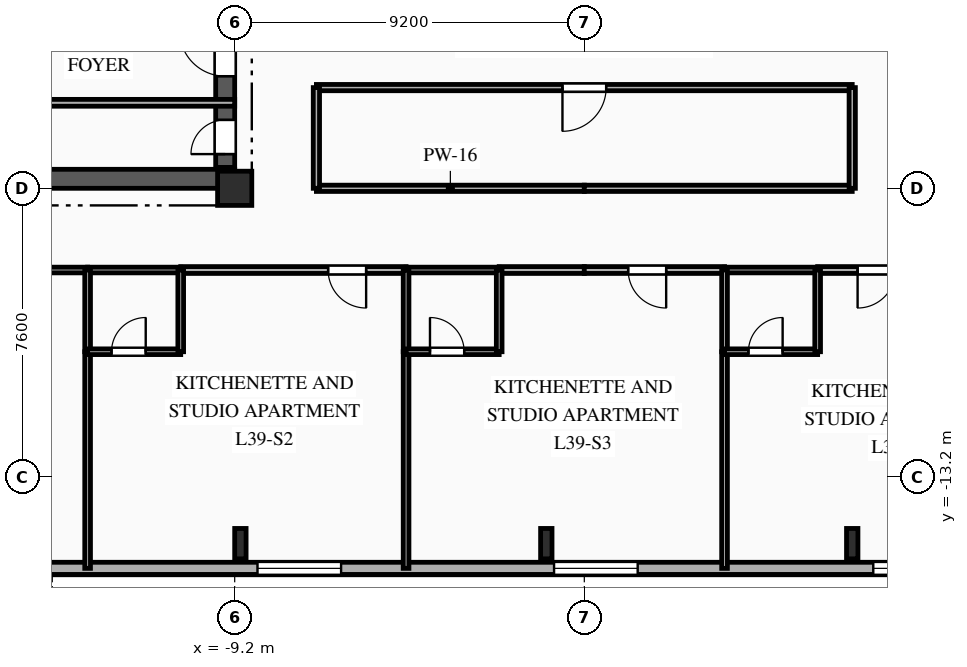
"""IFC4 building model, lengths in metres.
Left out: names, types, materials, properties, quantities, classifications, styles, units other than length and angle.
Written with IfcOpenShell. Run it as: python <this file> out.ifc"""

import sys

from ifc_helpers import new_model, si_unit, direction, frame, frame_2d, origin, origin_2d, place, context, subcontext, project, spatial, rectangle, i_section, extrude, element, fill, save


model = new_model("IFC4")
c1 = context("Model", 3, precision=1e-05, world=origin(), true_north=direction((0.0, 1.0)))
c2 = subcontext(c1, "Body", "Model", "MODEL_VIEW")
j1 = project(units=[si_unit("LENGTHUNIT", "METRE"), si_unit("PLANEANGLEUNIT", "RADIAN")], contexts=[c1])
p1 = place(None, origin())
s1 = spatial("IfcSite", under=j1, at=p1, CompositionType="ELEMENT")
p2 = place(p1, origin())
s2 = spatial("IfcBuilding", under=s1, at=p2, CompositionType="ELEMENT")
p3 = place(p2, frame((0.0, 0.0, 141.05)))
s3 = spatial("IfcBuildingStorey", under=s2, at=p3, CompositionType="ELEMENT", Elevation=141.05)
p4 = place(p3, frame((-9.2, -5.6, 0.0), z_axis=(0.0, 0.0, 1.0), x_axis=(1.0, 0.0, 0.0)))
e1 = element("IfcColumn", 1, at=p4, inside=s3, PredefinedType="COLUMN", context=c2, shape_type="SweptSolid", body=[
    extrude(rectangle(XDim=0.9, YDim=0.9, at=origin_2d()), origin(), (0.0, 0.0, 1.0), 3.35),
])
for number, where, z_axis, x_axis in (
    (2, (-9.05, -14.95, 0.0), (0.0, 0.0, 1.0), (1.0, 0.0, 0.0)),
    (3, (-1.0, -14.95, 0.0), (0.0, 0.0, 1.0), (1.0, 0.0, 0.0)),
    (4, (7.05, -14.95, 0.0), (0.0, 0.0, 1.0), (1.0, 0.0, 0.0)),
):
    element("IfcColumn", number, at=place(p3, frame(where, z_axis=z_axis, x_axis=x_axis)), inside=s3, PredefinedType="COLUMN", context=c2, shape_type="SweptSolid", body=[
        extrude(i_section(OverallWidth=0.3, OverallDepth=0.8, WebThickness=0.018, FlangeThickness=0.033, FilletRadius=0.03, at=origin_2d()), origin(), (0.0, 0.0, 1.0), 3.35),
    ])
p5 = place(p3, frame((23.8, -15.6, 0.0), z_axis=(0.0, 0.0, 1.0), x_axis=(-1.0, 0.0, 0.0)))
e5 = element("IfcWall", 5, at=p5, inside=s3, PredefinedType="SOLIDWALL", context=c2, shape_type="SweptSolid", body=[
    extrude(rectangle(XDim=49.6, YDim=0.32, at=frame_2d((24.8, 0.0))), origin(), (0.0, 0.0, 1.0), 3.04),
])
p6 = place(p5, frame((1.13, 0.0, 0.85)))
e6 = element("IfcOpeningElement", 6, at=p6, cuts=e5, PredefinedType="OPENING", context=c2, shape_type="SweptSolid", body=[
    extrude(rectangle(XDim=1.1, YDim=1.85, at=frame_2d((0.55, 0.925))), frame((0.0, 0.17, 0.0), z_axis=(0.0, -1.0, 0.0), x_axis=(1.0, 0.0, 0.0)), (0.0, 0.0, 1.0), 0.34),
])
p7 = place(p5, frame((6.495, 0.0, 0.85)))
e7 = element("IfcOpeningElement", 7, at=p7, cuts=e5, PredefinedType="OPENING", context=c2, shape_type="SweptSolid", body=[
    extrude(rectangle(XDim=1.65, YDim=1.85, at=frame_2d((0.825, 0.925))), frame((0.0, 0.17, 0.0), z_axis=(0.0, -1.0, 0.0), x_axis=(1.0, 0.0, 0.0)), (0.0, 0.0, 1.0), 0.34),
])
p8 = place(p5, frame((13.996, 0.0, 0.85)))
e8 = element("IfcOpeningElement", 8, at=p8, cuts=e5, PredefinedType="OPENING", context=c2, shape_type="SweptSolid", body=[
    extrude(rectangle(XDim=2.2, YDim=1.85, at=frame_2d((1.1, 0.925))), frame((0.0, 0.17, 0.0), z_axis=(0.0, -1.0, 0.0), x_axis=(1.0, 0.0, 0.0)), (0.0, 0.0, 1.0), 0.34),
])
p9 = place(p5, frame((22.396, 0.0, 0.85)))
e9 = element("IfcOpeningElement", 9, at=p9, cuts=e5, PredefinedType="OPENING", context=c2, shape_type="SweptSolid", body=[
    extrude(rectangle(XDim=2.2, YDim=1.85, at=frame_2d((1.1, 0.925))), frame((0.0, 0.17, 0.0), z_axis=(0.0, -1.0, 0.0), x_axis=(1.0, 0.0, 0.0)), (0.0, 0.0, 1.0), 0.34),
])
p10 = place(p5, frame((30.2, 0.0, 0.85)))
e10 = element("IfcOpeningElement", 10, at=p10, cuts=e5, PredefinedType="OPENING", context=c2, shape_type="SweptSolid", body=[
    extrude(rectangle(XDim=2.2, YDim=1.85, at=frame_2d((1.1, 0.925))), frame((0.0, 0.17, 0.0), z_axis=(0.0, -1.0, 0.0), x_axis=(1.0, 0.0, 0.0)), (0.0, 0.0, 1.0), 0.34),
])
p11 = place(p5, frame((38.673, 0.0, 0.85)))
e11 = element("IfcOpeningElement", 11, at=p11, cuts=e5, PredefinedType="OPENING", context=c2, shape_type="SweptSolid", body=[
    extrude(rectangle(XDim=1.65, YDim=1.85, at=frame_2d((0.825, 0.925))), frame((0.0, 0.17, 0.0), z_axis=(0.0, -1.0, 0.0), x_axis=(1.0, 0.0, 0.0)), (0.0, 0.0, 1.0), 0.34),
])
p12 = place(p5, frame((46.175, 0.0, 0.85)))
e12 = element("IfcOpeningElement", 12, at=p12, cuts=e5, PredefinedType="OPENING", context=c2, shape_type="SweptSolid", body=[
    extrude(rectangle(XDim=1.65, YDim=1.85, at=frame_2d((0.825, 0.925))), frame((0.0, 0.17, 0.0), z_axis=(0.0, -1.0, 0.0), x_axis=(1.0, 0.0, 0.0)), (0.0, 0.0, 1.0), 0.34),
])
p13 = place(p3, frame((-18.8, -5.35, 0.0), z_axis=(0.0, 0.0, 1.0), x_axis=(1.0, 0.0, 0.0)))
e13 = element("IfcWall", 13, at=p13, inside=s3, PredefinedType="SHEAR", context=c2, shape_type="SweptSolid", body=[
    extrude(rectangle(XDim=9.6, YDim=0.5, at=frame_2d((4.8, 0.0))), origin(), (0.0, 0.0, 1.0), 3.04),
])
p14 = place(p13, frame((1.05, 0.0, 0.0)))
e14 = element("IfcOpeningElement", 14, at=p14, cuts=e13, PredefinedType="OPENING", context=c2, shape_type="SweptSolid", body=[
    extrude(rectangle(XDim=0.9, YDim=2.1, at=frame_2d((0.45, 1.05))), frame((0.0, 0.26, 0.0), z_axis=(0.0, -1.0, 0.0), x_axis=(1.0, 0.0, 0.0)), (0.0, 0.0, 1.0), 0.52),
])
p15 = place(p3, frame((-9.45, -5.05, 0.0), z_axis=(0.0, 0.0, 1.0), x_axis=(0.0, 1.0, 0.0)))
e15 = element("IfcWall", 15, at=p15, inside=s3, PredefinedType="SHEAR", context=c2, shape_type="SweptSolid", body=[
    extrude(rectangle(XDim=10.1, YDim=0.5, at=frame_2d((5.05, 0.0))), origin(), (0.0, 0.0, 1.0), 3.04),
])
p16 = place(p15, frame((7.15, 0.0, 0.0)))
e16 = element("IfcOpeningElement", 16, at=p16, cuts=e15, PredefinedType="OPENING", context=c2, shape_type="SweptSolid", body=[
    extrude(rectangle(XDim=0.9, YDim=2.1, at=frame_2d((0.45, 1.05))), frame((0.0, 0.26, 0.0), z_axis=(0.0, -1.0, 0.0), x_axis=(1.0, 0.0, 0.0)), (0.0, 0.0, 1.0), 0.52),
])
p17 = place(p15, frame((2.4, 0.0, 0.0)))
e17 = element("IfcOpeningElement", 17, at=p17, cuts=e15, PredefinedType="OPENING", context=c2, shape_type="SweptSolid", body=[
    extrude(rectangle(XDim=1.2, YDim=2.15, at=frame_2d((0.6, 1.075))), frame((0.0, 0.26, 0.0), z_axis=(0.0, -1.0, 0.0), x_axis=(1.0, 0.0, 0.0)), (0.0, 0.0, 1.0), 0.52),
])
p18 = place(p15, frame((0.35, 0.0, 0.0)))
e18 = element("IfcOpeningElement", 18, at=p18, cuts=e15, PredefinedType="OPENING", context=c2, shape_type="SweptSolid", body=[
    extrude(rectangle(XDim=0.9, YDim=2.1, at=frame_2d((0.45, 1.05))), frame((0.0, 0.26, 0.0), z_axis=(0.0, -1.0, 0.0), x_axis=(1.0, 0.0, 0.0)), (0.0, 0.0, 1.0), 0.52),
])
p19 = place(p15, frame((5.0, 0.0, 0.0)))
e19 = element("IfcOpeningElement", 19, at=p19, cuts=e15, PredefinedType="OPENING", context=c2, shape_type="SweptSolid", body=[
    extrude(rectangle(XDim=0.9, YDim=2.1, at=frame_2d((0.45, 1.05))), frame((0.0, 0.26, 0.0), z_axis=(0.0, -1.0, 0.0), x_axis=(1.0, 0.0, 0.0)), (0.0, 0.0, 1.0), 0.52),
])
p20 = place(p3, frame((-15.05, -3.35, 0.0), z_axis=(0.0, 0.0, 1.0), x_axis=(1.0, 0.0, 0.0)))
e20 = element("IfcWall", 20, at=p20, inside=s3, PredefinedType="PARTITIONING", context=c2, shape_type="SweptSolid", body=[
    extrude(rectangle(XDim=5.85, YDim=0.18, at=frame_2d((2.925, 0.0))), origin(), (0.0, 0.0, 1.0), 2.755),
])
p21 = place(p3, frame((-13.07, -7.75, 0.0), z_axis=(0.0, 0.0, 1.0), x_axis=(-1.0, 0.0, 0.0)))
e21 = element("IfcWall", 21, at=p21, inside=s3, PredefinedType="PARTITIONING", context=c2, shape_type="SweptSolid", body=[
    extrude(rectangle(XDim=7.88, YDim=0.15, at=frame_2d((3.94, 0.0))), origin(), (0.0, 0.0, 1.0), 3.04),
])
p22 = place(p21, frame((1.289, 0.0, 0.0)))
e22 = element("IfcOpeningElement", 22, at=p22, cuts=e21, PredefinedType="OPENING", context=c2, shape_type="SweptSolid", body=[
    extrude(rectangle(XDim=1.05, YDim=2.15, at=frame_2d((0.525, 1.075))), frame((0.0, 0.085, 0.0), z_axis=(0.0, -1.0, 0.0), x_axis=(1.0, 0.0, 0.0)), (0.0, 0.0, 1.0), 0.17),
])
p23 = place(p3, frame((-4.69, -7.75, 0.0), z_axis=(0.0, 0.0, 1.0), x_axis=(-1.0, 0.0, 0.0)))
e23 = element("IfcWall", 23, at=p23, inside=s3, PredefinedType="PARTITIONING", context=c2, shape_type="SweptSolid", body=[
    extrude(rectangle(XDim=5.93, YDim=0.18, at=frame_2d((2.965, 0.0))), origin(), (0.0, 0.0, 1.0), 3.04),
])
p24 = place(p23, frame((1.051, 0.0, 0.0)))
e24 = element("IfcOpeningElement", 24, at=p24, cuts=e23, PredefinedType="OPENING", context=c2, shape_type="SweptSolid", body=[
    extrude(rectangle(XDim=1.0, YDim=2.15, at=frame_2d((0.5, 1.075))), frame((0.0, 0.1, 0.0), z_axis=(0.0, -1.0, 0.0), x_axis=(1.0, 0.0, 0.0)), (0.0, 0.0, 1.0), 0.2),
])
p25 = place(p3, frame((-10.62, -7.75, 0.0), z_axis=(0.0, 0.0, 1.0), x_axis=(-1.0, 0.0, 0.0)))
e25 = element("IfcWall", 25, at=p25, inside=s3, PredefinedType="PLUMBINGWALL", context=c2, shape_type="SweptSolid", body=[
    extrude(rectangle(XDim=2.45, YDim=0.15, at=frame_2d((1.225, 0.0))), origin(), (0.0, 0.0, 1.0), 3.04),
])
p26 = place(p3, frame((0.0, -7.75, 0.0), z_axis=(0.0, 0.0, 1.0), x_axis=(-1.0, 0.0, 0.0)))
e26 = element("IfcWall", 26, at=p26, inside=s3, PredefinedType="PARTITIONING", context=c2, shape_type="SweptSolid", body=[
    extrude(rectangle(XDim=2.24, YDim=0.18, at=frame_2d((1.12, 0.0))), origin(), (0.0, 0.0, 1.0), 3.04),
])
p27 = place(p3, frame((-2.24, -7.75, 0.0), z_axis=(0.0, 0.0, 1.0), x_axis=(-1.0, 0.0, 0.0)))
e27 = element("IfcWall", 27, at=p27, inside=s3, PredefinedType="PLUMBINGWALL", context=c2, shape_type="SweptSolid", body=[
    extrude(rectangle(XDim=2.45, YDim=0.15, at=frame_2d((1.225, 0.0))), origin(), (0.0, 0.0, 1.0), 3.04),
])
p28 = place(p3, frame((-7.05, -5.6, 0.0), z_axis=(0.0, 0.0, 1.0), x_axis=(1.0, 0.0, 0.0)))
e28 = element("IfcWall", 28, at=p28, inside=s3, PredefinedType="PARTITIONING", context=c2, shape_type="SweptSolid", body=[
    extrude(rectangle(XDim=7.05, YDim=0.165, at=frame_2d((3.525, 0.0))), origin(), (0.0, 0.0, 1.0), 2.525),
])
p29 = place(p3, frame((3.69, -7.75, 0.0), z_axis=(0.0, 0.0, 1.0), x_axis=(-1.0, 0.0, 0.0)))
e29 = element("IfcWall", 29, at=p29, inside=s3, PredefinedType="PARTITIONING", context=c2, shape_type="SweptSolid", body=[
    extrude(rectangle(XDim=3.69, YDim=0.18, at=frame_2d((1.845, 0.0))), origin(), (0.0, 0.0, 1.0), 3.04),
])
p30 = place(p29, frame((1.536, 0.0, 0.0)))
e30 = element("IfcOpeningElement", 30, at=p30, cuts=e29, PredefinedType="OPENING", context=c2, shape_type="SweptSolid", body=[
    extrude(rectangle(XDim=1.0, YDim=2.15, at=frame_2d((0.5, 1.075))), frame((0.0, 0.1, 0.0), z_axis=(0.0, -1.0, 0.0), x_axis=(1.0, 0.0, 0.0)), (0.0, 0.0, 1.0), 0.2),
])
p31 = place(p3, frame((12.07, -7.75, 0.0), z_axis=(0.0, 0.0, 1.0), x_axis=(-1.0, 0.0, 0.0)))
e31 = element("IfcWall", 31, at=p31, inside=s3, PredefinedType="PARTITIONING", context=c2, shape_type="SweptSolid", body=[
    extrude(rectangle(XDim=5.93, YDim=0.18, at=frame_2d((2.965, 0.0))), origin(), (0.0, 0.0, 1.0), 3.04),
])
p32 = place(p31, frame((3.879, 0.0, 0.0)))
e32 = element("IfcOpeningElement", 32, at=p32, cuts=e31, PredefinedType="OPENING", context=c2, shape_type="SweptSolid", body=[
    extrude(rectangle(XDim=1.0, YDim=2.15, at=frame_2d((0.5, 1.075))), frame((0.0, 0.1, 0.0), z_axis=(0.0, -1.0, 0.0), x_axis=(1.0, 0.0, 0.0)), (0.0, 0.0, 1.0), 0.2),
])
p33 = place(p3, frame((6.14, -7.75, 0.0), z_axis=(0.0, 0.0, 1.0), x_axis=(-1.0, 0.0, 0.0)))
e33 = element("IfcWall", 33, at=p33, inside=s3, PredefinedType="PLUMBINGWALL", context=c2, shape_type="SweptSolid", body=[
    extrude(rectangle(XDim=2.45, YDim=0.15, at=frame_2d((1.225, 0.0))), origin(), (0.0, 0.0, 1.0), 3.04),
])
p34 = place(p3, frame((0.0, -5.6, 0.0), z_axis=(0.0, 0.0, 1.0), x_axis=(1.0, 0.0, 0.0)))
e34 = element("IfcWall", 34, at=p34, inside=s3, PredefinedType="PARTITIONING", context=c2, shape_type="SweptSolid", body=[
    extrude(rectangle(XDim=7.05, YDim=0.165, at=frame_2d((3.525, 0.0))), origin(), (0.0, 0.0, 1.0), 2.525),
])
p35 = place(p3, frame((7.05, -2.95, 0.0), z_axis=(0.0, 0.0, 1.0), x_axis=(-1.0, 0.0, 0.0)))
e35 = element("IfcWall", 35, at=p35, inside=s3, PredefinedType="PARTITIONING", context=c2, shape_type="SweptSolid", body=[
    extrude(rectangle(XDim=14.1, YDim=0.165, at=frame_2d((7.05, 0.0))), origin(), (0.0, 0.0, 1.0), 3.04),
])
p36 = place(p35, frame((6.475, 0.0, 0.0)))
e36 = element("IfcOpeningElement", 36, at=p36, cuts=e35, PredefinedType="OPENING", context=c2, shape_type="SweptSolid", body=[
    extrude(rectangle(XDim=1.15, YDim=2.15, at=frame_2d((0.575, 1.075))), frame((0.0, 0.093, 0.0), z_axis=(0.0, -1.0, 0.0), x_axis=(1.0, 0.0, 0.0)), (0.0, 0.0, 1.0), 0.185),
])
for number, where, z_axis, x_axis in (
    (37, (-7.05, -2.95, 0.0), (0.0, 0.0, 1.0), (0.0, -1.0, 0.0)),
    (38, (7.05, -5.6, 0.0), (0.0, 0.0, 1.0), (0.0, 1.0, 0.0)),
):
    element("IfcWall", number, at=place(p3, frame(where, z_axis=z_axis, x_axis=x_axis)), inside=s3, PredefinedType="PARTITIONING", context=c2, shape_type="SweptSolid", body=[
        extrude(rectangle(XDim=2.65, YDim=0.165, at=frame_2d((1.325, 0.0))), origin(), (0.0, 0.0, 1.0), 3.04),
    ])
p37 = place(p3, frame((-13.07, -9.9, 0.0), z_axis=(0.0, 0.0, 1.0), x_axis=(0.0, -1.0, 0.0)))
e39 = element("IfcWall", 39, at=p37, inside=s3, PredefinedType="PARTITIONING", context=c2, shape_type="SweptSolid", body=[
    extrude(rectangle(XDim=5.7, YDim=0.15, at=frame_2d((2.85, 0.0))), origin(), (0.0, 0.0, 1.0), 3.04),
])
p38 = place(p3, frame((-13.07, -7.75, 0.0), z_axis=(0.0, 0.0, 1.0), x_axis=(0.0, -1.0, 0.0)))
e40 = element("IfcWall", 40, at=p38, inside=s3, PredefinedType="PLUMBINGWALL", context=c2, shape_type="SweptSolid", body=[
    extrude(rectangle(XDim=2.15, YDim=0.15, at=frame_2d((1.075, 0.0))), origin(), (0.0, 0.0, 1.0), 3.04),
])
p39 = place(p3, frame((-13.07, -9.9, 0.0), z_axis=(0.0, 0.0, 1.0), x_axis=(1.0, 0.0, 0.0)))
e41 = element("IfcWall", 41, at=p39, inside=s3, PredefinedType="PLUMBINGWALL", context=c2, shape_type="SweptSolid", body=[
    extrude(rectangle(XDim=2.45, YDim=0.15, at=frame_2d((1.225, 0.0))), origin(), (0.0, 0.0, 1.0), 3.04),
])
p40 = place(p39, frame((0.629, 0.0, 0.0)))
e42 = element("IfcOpeningElement", 42, at=p40, cuts=e41, PredefinedType="OPENING", context=c2, shape_type="SweptSolid", body=[
    extrude(rectangle(XDim=0.9, YDim=2.1, at=frame_2d((0.45, 1.05))), frame((0.0, 0.085, 0.0), z_axis=(0.0, -1.0, 0.0), x_axis=(1.0, 0.0, 0.0)), (0.0, 0.0, 1.0), 0.17),
])
p41 = place(p3, frame((-10.62, -9.9, 0.0), z_axis=(0.0, 0.0, 1.0), x_axis=(0.0, 1.0, 0.0)))
e43 = element("IfcWall", 43, at=p41, inside=s3, PredefinedType="PLUMBINGWALL", context=c2, shape_type="SweptSolid", body=[
    extrude(rectangle(XDim=2.15, YDim=0.15, at=frame_2d((1.075, 0.0))), origin(), (0.0, 0.0, 1.0), 3.04),
])
p42 = place(p3, frame((-4.69, -9.9, 0.0), z_axis=(0.0, 0.0, 1.0), x_axis=(0.0, -1.0, 0.0)))
e44 = element("IfcWall", 44, at=p42, inside=s3, PredefinedType="PARTITIONING", context=c2, shape_type="SweptSolid", body=[
    extrude(rectangle(XDim=5.7, YDim=0.15, at=frame_2d((2.85, 0.0))), origin(), (0.0, 0.0, 1.0), 3.04),
])
p43 = place(p3, frame((-4.69, -7.75, 0.0), z_axis=(0.0, 0.0, 1.0), x_axis=(0.0, -1.0, 0.0)))
e45 = element("IfcWall", 45, at=p43, inside=s3, PredefinedType="PLUMBINGWALL", context=c2, shape_type="SweptSolid", body=[
    extrude(rectangle(XDim=2.15, YDim=0.15, at=frame_2d((1.075, 0.0))), origin(), (0.0, 0.0, 1.0), 3.04),
])
p44 = place(p3, frame((-4.69, -9.9, 0.0), z_axis=(0.0, 0.0, 1.0), x_axis=(1.0, 0.0, 0.0)))
e46 = element("IfcWall", 46, at=p44, inside=s3, PredefinedType="PLUMBINGWALL", context=c2, shape_type="SweptSolid", body=[
    extrude(rectangle(XDim=2.45, YDim=0.15, at=frame_2d((1.225, 0.0))), origin(), (0.0, 0.0, 1.0), 3.04),
])
p45 = place(p44, frame((0.629, 0.0, 0.0)))
e47 = element("IfcOpeningElement", 47, at=p45, cuts=e46, PredefinedType="OPENING", context=c2, shape_type="SweptSolid", body=[
    extrude(rectangle(XDim=0.9, YDim=2.1, at=frame_2d((0.45, 1.05))), frame((0.0, 0.085, 0.0), z_axis=(0.0, -1.0, 0.0), x_axis=(1.0, 0.0, 0.0)), (0.0, 0.0, 1.0), 0.17),
])
p46 = place(p3, frame((-2.24, -9.9, 0.0), z_axis=(0.0, 0.0, 1.0), x_axis=(0.0, 1.0, 0.0)))
e48 = element("IfcWall", 48, at=p46, inside=s3, PredefinedType="PLUMBINGWALL", context=c2, shape_type="SweptSolid", body=[
    extrude(rectangle(XDim=2.15, YDim=0.15, at=frame_2d((1.075, 0.0))), origin(), (0.0, 0.0, 1.0), 3.04),
])
p47 = place(p3, frame((3.69, -9.9, 0.0), z_axis=(0.0, 0.0, 1.0), x_axis=(0.0, -1.0, 0.0)))
e49 = element("IfcWall", 49, at=p47, inside=s3, PredefinedType="PARTITIONING", context=c2, shape_type="SweptSolid", body=[
    extrude(rectangle(XDim=5.7, YDim=0.15, at=frame_2d((2.85, 0.0))), origin(), (0.0, 0.0, 1.0), 3.04),
])
p48 = place(p3, frame((3.69, -7.75, 0.0), z_axis=(0.0, 0.0, 1.0), x_axis=(0.0, -1.0, 0.0)))
e50 = element("IfcWall", 50, at=p48, inside=s3, PredefinedType="PLUMBINGWALL", context=c2, shape_type="SweptSolid", body=[
    extrude(rectangle(XDim=2.15, YDim=0.15, at=frame_2d((1.075, 0.0))), origin(), (0.0, 0.0, 1.0), 3.04),
])
p49 = place(p3, frame((3.69, -9.9, 0.0), z_axis=(0.0, 0.0, 1.0), x_axis=(1.0, 0.0, 0.0)))
e51 = element("IfcWall", 51, at=p49, inside=s3, PredefinedType="PLUMBINGWALL", context=c2, shape_type="SweptSolid", body=[
    extrude(rectangle(XDim=2.45, YDim=0.15, at=frame_2d((1.225, 0.0))), origin(), (0.0, 0.0, 1.0), 3.04),
])
p50 = place(p49, frame((0.629, 0.0, 0.0)))
e52 = element("IfcOpeningElement", 52, at=p50, cuts=e51, PredefinedType="OPENING", context=c2, shape_type="SweptSolid", body=[
    extrude(rectangle(XDim=0.9, YDim=2.1, at=frame_2d((0.45, 1.05))), frame((0.0, 0.085, 0.0), z_axis=(0.0, -1.0, 0.0), x_axis=(1.0, 0.0, 0.0)), (0.0, 0.0, 1.0), 0.17),
])
p51 = place(p3, frame((6.14, -9.9, 0.0), z_axis=(0.0, 0.0, 1.0), x_axis=(0.0, 1.0, 0.0)))
e53 = element("IfcWall", 53, at=p51, inside=s3, PredefinedType="PLUMBINGWALL", context=c2, shape_type="SweptSolid", body=[
    extrude(rectangle(XDim=2.15, YDim=0.15, at=frame_2d((1.075, 0.0))), origin(), (0.0, 0.0, 1.0), 3.04),
])
p52 = place(p8, origin())
e54 = element("IfcWindow", 54, at=p52, inside=s3, PartitioningType="SINGLE_PANEL", PredefinedType="WINDOW", context=c2, shape_type="SweptSolid", body=[
    extrude(rectangle(XDim=2.2, YDim=1.85, at=frame_2d((1.1, 0.925))), frame((0.0, 0.03, 0.0), z_axis=(0.0, -1.0, 0.0), x_axis=(1.0, 0.0, 0.0)), (0.0, 0.0, 1.0), 0.06),
])
fill(e8, e54)
p53 = place(p9, origin())
e55 = element("IfcWindow", 55, at=p53, inside=s3, PartitioningType="SINGLE_PANEL", PredefinedType="WINDOW", context=c2, shape_type="SweptSolid", body=[
    extrude(rectangle(XDim=2.2, YDim=1.85, at=frame_2d((1.1, 0.925))), frame((0.0, 0.03, 0.0), z_axis=(0.0, -1.0, 0.0), x_axis=(1.0, 0.0, 0.0)), (0.0, 0.0, 1.0), 0.06),
])
fill(e9, e55)
p54 = place(p10, origin())
e56 = element("IfcWindow", 56, at=p54, inside=s3, PartitioningType="SINGLE_PANEL", PredefinedType="WINDOW", context=c2, shape_type="SweptSolid", body=[
    extrude(rectangle(XDim=2.2, YDim=1.85, at=frame_2d((1.1, 0.925))), frame((0.0, 0.03, 0.0), z_axis=(0.0, -1.0, 0.0), x_axis=(1.0, 0.0, 0.0)), (0.0, 0.0, 1.0), 0.06),
])
fill(e10, e56)
p55 = place(p17, origin())
e57 = element("IfcDoor", 57, at=p55, inside=s3, OperationType="SINGLE_SWING_RIGHT", PredefinedType="DOOR", context=c2, shape_type="SweptSolid", body=[
    extrude(rectangle(XDim=1.2, YDim=2.15, at=frame_2d((0.6, 1.075))), frame((0.0, 0.025, 0.0), z_axis=(0.0, -1.0, 0.0), x_axis=(1.0, 0.0, 0.0)), (0.0, 0.0, 1.0), 0.05),
])
fill(e17, e57)
p56 = place(p18, origin())
e58 = element("IfcDoor", 58, at=p56, inside=s3, OperationType="SINGLE_SWING_LEFT", PredefinedType="DOOR", context=c2, shape_type="SweptSolid", body=[
    extrude(rectangle(XDim=0.9, YDim=2.1, at=frame_2d((0.45, 1.05))), frame((0.0, 0.025, 0.0), z_axis=(0.0, -1.0, 0.0), x_axis=(1.0, 0.0, 0.0)), (0.0, 0.0, 1.0), 0.05),
])
fill(e18, e58)
p57 = place(p24, origin())
e59 = element("IfcDoor", 59, at=p57, inside=s3, OperationType="SINGLE_SWING_LEFT", PredefinedType="DOOR", context=c2, shape_type="SweptSolid", body=[
    extrude(rectangle(XDim=1.0, YDim=2.15, at=frame_2d((0.5, 1.075))), frame((0.0, 0.025, 0.0), z_axis=(0.0, -1.0, 0.0), x_axis=(1.0, 0.0, 0.0)), (0.0, 0.0, 1.0), 0.05),
])
fill(e24, e59)
p58 = place(p30, origin())
e60 = element("IfcDoor", 60, at=p58, inside=s3, OperationType="SINGLE_SWING_LEFT", PredefinedType="DOOR", context=c2, shape_type="SweptSolid", body=[
    extrude(rectangle(XDim=1.0, YDim=2.15, at=frame_2d((0.5, 1.075))), frame((0.0, 0.025, 0.0), z_axis=(0.0, -1.0, 0.0), x_axis=(1.0, 0.0, 0.0)), (0.0, 0.0, 1.0), 0.05),
])
fill(e30, e60)
p59 = place(p32, origin())
e61 = element("IfcDoor", 61, at=p59, inside=s3, OperationType="SINGLE_SWING_RIGHT", PredefinedType="DOOR", context=c2, shape_type="SweptSolid", body=[
    extrude(rectangle(XDim=1.0, YDim=2.15, at=frame_2d((0.5, 1.075))), frame((0.0, 0.025, 0.0), z_axis=(0.0, -1.0, 0.0), x_axis=(1.0, 0.0, 0.0)), (0.0, 0.0, 1.0), 0.05),
])
fill(e32, e61)
p60 = place(p36, origin())
e62 = element("IfcDoor", 62, at=p60, inside=s3, OperationType="SINGLE_SWING_RIGHT", PredefinedType="DOOR", context=c2, shape_type="SweptSolid", body=[
    extrude(rectangle(XDim=1.15, YDim=2.15, at=frame_2d((0.575, 1.075))), frame((0.0, 0.025, 0.0), z_axis=(0.0, -1.0, 0.0), x_axis=(1.0, 0.0, 0.0)), (0.0, 0.0, 1.0), 0.05),
])
fill(e36, e62)
p61 = place(p40, origin())
e63 = element("IfcDoor", 63, at=p61, inside=s3, OperationType="SINGLE_SWING_RIGHT", PredefinedType="DOOR", context=c2, shape_type="SweptSolid", body=[
    extrude(rectangle(XDim=0.9, YDim=2.1, at=frame_2d((0.45, 1.05))), frame((0.0, 0.025, 0.0), z_axis=(0.0, -1.0, 0.0), x_axis=(1.0, 0.0, 0.0)), (0.0, 0.0, 1.0), 0.05),
])
fill(e42, e63)
p62 = place(p45, origin())
e64 = element("IfcDoor", 64, at=p62, inside=s3, OperationType="SINGLE_SWING_LEFT", PredefinedType="DOOR", context=c2, shape_type="SweptSolid", body=[
    extrude(rectangle(XDim=0.9, YDim=2.1, at=frame_2d((0.45, 1.05))), frame((0.0, 0.025, 0.0), z_axis=(0.0, -1.0, 0.0), x_axis=(1.0, 0.0, 0.0)), (0.0, 0.0, 1.0), 0.05),
])
fill(e47, e64)
p63 = place(p50, origin())
e65 = element("IfcDoor", 65, at=p63, inside=s3, OperationType="SINGLE_SWING_RIGHT", PredefinedType="DOOR", context=c2, shape_type="SweptSolid", body=[
    extrude(rectangle(XDim=0.9, YDim=2.1, at=frame_2d((0.45, 1.05))), frame((0.0, 0.025, 0.0), z_axis=(0.0, -1.0, 0.0), x_axis=(1.0, 0.0, 0.0)), (0.0, 0.0, 1.0), 0.05),
])
fill(e52, e65)
save(model, sys.argv[1])
